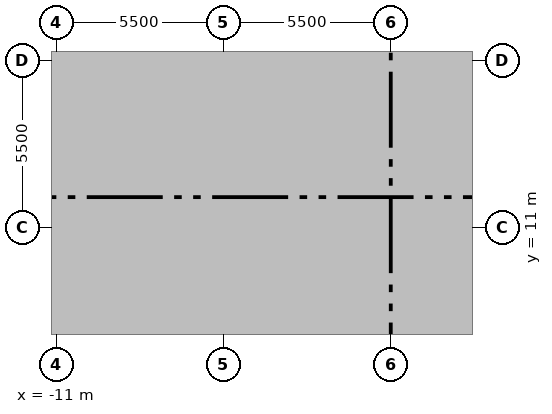
"""IFC4 building model, lengths in metres.
Left out: names, types, materials, properties, quantities, classifications, styles, units other than length and angle.
Written with IfcOpenShell. Run it as: python <this file> out.ifc"""

import sys

from ifc_helpers import new_model, si_unit, direction, frame, frame_2d, origin, origin_2d, place, context, subcontext, project, spatial, rectangle, extrude, source, transform, mapped, element, fill, save


model = new_model("IFC4")
c1 = context("Model", 3, precision=1e-05, world=origin(), true_north=direction((0.0, 1.0)))
c2 = subcontext(c1, "Body", "Model", "MODEL_VIEW")
j1 = project(units=[si_unit("LENGTHUNIT", "METRE"), si_unit("PLANEANGLEUNIT", "RADIAN")], contexts=[c1])
p1 = place(None, origin())
s1 = spatial("IfcSite", under=j1, at=p1, CompositionType="ELEMENT")
p2 = place(p1, origin())
s2 = spatial("IfcBuilding", under=s1, at=p2, CompositionType="ELEMENT")
p3 = place(p2, origin())
s3 = spatial("IfcBuildingStorey", under=s2, at=p3, CompositionType="ELEMENT", Elevation=0.0)
p4 = place(p3, frame((-11.0, 16.175, 0.0), z_axis=(0.0, 0.0, 1.0), x_axis=(1.0, 0.0, 0.0)))
e1 = element("IfcWall", 1, at=p4, inside=s3, PredefinedType="SHEAR", context=c2, shape_type="SweptSolid", body=[
    extrude(rectangle(XDim=22.0, YDim=0.85, at=frame_2d((11.0, 0.0))), origin(), (0.0, 0.0, 1.0), 5.15),
])
p5 = place(p4, frame((3.57, 0.0, 0.0)))
e2 = element("IfcOpeningElement", 2, at=p5, cuts=e1, PredefinedType="OPENING", context=c2, shape_type="SweptSolid", body=[
    extrude(rectangle(XDim=1.3, YDim=2.3, at=frame_2d((0.65, 1.15))), frame((0.0, 0.435, 0.0), z_axis=(0.0, -1.0, 0.0), x_axis=(1.0, 0.0, 0.0)), (0.0, 0.0, 1.0), 0.87),
])
p6 = place(p4, frame((10.0, 0.0, 0.0)))
e3 = element("IfcOpeningElement", 3, at=p6, cuts=e1, PredefinedType="OPENING", context=c2, shape_type="SweptSolid", body=[
    extrude(rectangle(XDim=2.0, YDim=2.4, at=frame_2d((1.0, 1.2))), frame((0.0, 0.435, 0.0), z_axis=(0.0, -1.0, 0.0), x_axis=(1.0, 0.0, 0.0)), (0.0, 0.0, 1.0), 0.87),
])
p7 = place(p3, frame((-10.575, 0.425, 0.0), z_axis=(0.0, 0.0, 1.0), x_axis=(0.0, 1.0, 0.0)))
e4 = element("IfcWall", 4, at=p7, inside=s3, PredefinedType="SHEAR", context=c2, shape_type="SweptSolid", body=[
    extrude(rectangle(XDim=15.75, YDim=0.85, at=frame_2d((7.875, 0.0))), origin(), (0.0, 0.0, 1.0), 5.15),
])
p8 = place(p7, frame((9.125, 0.0, 0.0)))
e5 = element("IfcOpeningElement", 5, at=p8, cuts=e4, PredefinedType="OPENING", context=c2, shape_type="SweptSolid", body=[
    extrude(rectangle(XDim=1.1, YDim=2.2, at=frame_2d((0.55, 1.1))), frame((0.0, 0.435, 0.0), z_axis=(0.0, -1.0, 0.0), x_axis=(1.0, 0.0, 0.0)), (0.0, 0.0, 1.0), 0.87),
])
p9 = place(p3, frame((-5.5, 0.425, 0.0), z_axis=(0.0, 0.0, 1.0), x_axis=(0.0, 1.0, 0.0)))
e6 = element("IfcWall", 6, at=p9, inside=s3, PredefinedType="SHEAR", context=c2, shape_type="SweptSolid", body=[
    extrude(rectangle(XDim=15.75, YDim=0.4, at=frame_2d((7.875, 0.0))), origin(), (0.0, 0.0, 1.0), 5.15),
])
p10 = place(p9, frame((9.075, 0.0, 0.0)))
e7 = element("IfcOpeningElement", 7, at=p10, cuts=e6, PredefinedType="OPENING", context=c2, shape_type="SweptSolid", body=[
    extrude(rectangle(XDim=1.1, YDim=2.2, at=frame_2d((0.55, 1.1))), frame((0.0, 0.21, 0.0), z_axis=(0.0, -1.0, 0.0), x_axis=(1.0, 0.0, 0.0)), (0.0, 0.0, 1.0), 0.42),
])
m1 = source(origin(), c2, "Body", "SweptSolid", [
    extrude(rectangle(XDim=0.45, YDim=0.95, at=origin_2d()), origin(), (0.0, 0.0, 1.0), 5.5),
])
p11 = place(p3, frame((-5.5, 16.05, 0.0), z_axis=(0.0, 0.0, 1.0), x_axis=(1.0, 0.0, 0.0)))
e8 = element("IfcColumn", 8, at=p11, inside=s3, PredefinedType="PILASTER", context=c2, shape_type="MappedRepresentation", body=[
    mapped(m1, transform((0.0, 0.0, 0.0), scale=1.0)),
])
p12 = place(p3, frame((-6.85, 0.85, 0.0), z_axis=(0.0, 0.0, 1.0), x_axis=(0.0, 1.0, 0.0)))
e9 = element("IfcWall", 9, at=p12, inside=s3, PredefinedType="SOLIDWALL", context=c2, shape_type="SweptSolid", body=[
    extrude(rectangle(XDim=7.5, YDim=0.25, at=frame_2d((3.75, 0.0))), origin(), (0.0, 0.0, 1.0), 5.15),
])
p13 = place(p3, frame((-10.15, 8.35, 0.0), z_axis=(0.0, 0.0, 1.0), x_axis=(1.0, 0.0, 0.0)))
e10 = element("IfcWall", 10, at=p13, inside=s3, PredefinedType="SOLIDWALL", context=c2, shape_type="SweptSolid", body=[
    extrude(rectangle(XDim=4.65, YDim=0.22, at=frame_2d((2.325, 0.0))), origin(), (0.0, 0.0, 1.0), 5.15),
])
p14 = place(p13, frame((1.0, 0.0, 0.0)))
e11 = element("IfcOpeningElement", 11, at=p14, cuts=e10, PredefinedType="OPENING", context=c2, shape_type="SweptSolid", body=[
    extrude(rectangle(XDim=1.15, YDim=2.2, at=frame_2d((0.575, 1.1))), frame((0.0, 0.12, 0.0), z_axis=(0.0, -1.0, 0.0), x_axis=(1.0, 0.0, 0.0)), (0.0, 0.0, 1.0), 0.24),
])
p15 = place(p3, frame((-5.5, 11.87, 0.0), z_axis=(0.0, 0.0, 1.0), x_axis=(-1.0, 0.0, 0.0)))
e12 = element("IfcWall", 12, at=p15, inside=s3, PredefinedType="SOLIDWALL", context=c2, shape_type="SweptSolid", body=[
    extrude(rectangle(XDim=4.65, YDim=0.25, at=frame_2d((2.325, 0.0))), origin(), (0.0, 0.0, 1.0), 5.15),
])
p16 = place(p15, frame((2.95, 0.0, 0.0)))
e13 = element("IfcOpeningElement", 13, at=p16, cuts=e12, PredefinedType="OPENING", context=c2, shape_type="SweptSolid", body=[
    extrude(rectangle(XDim=1.2, YDim=2.25, at=frame_2d((0.6, 1.125))), frame((0.0, 0.135, 0.0), z_axis=(0.0, -1.0, 0.0), x_axis=(1.0, 0.0, 0.0)), (0.0, 0.0, 1.0), 0.27),
])
p17 = place(p3, frame((-7.84, 11.87, 0.0), z_axis=(0.0, 0.0, 1.0), x_axis=(0.0, 1.0, 0.0)))
e14 = element("IfcWall", 14, at=p17, inside=s3, PredefinedType="SOLIDWALL", context=c2, shape_type="SweptSolid", body=[
    extrude(rectangle(XDim=3.88, YDim=0.22, at=frame_2d((1.94, 0.0))), origin(), (0.0, 0.0, 1.0), 5.15),
])
p18 = place(p3, frame((-5.5, 8.3, 0.0), z_axis=(0.0, 0.0, 1.0), x_axis=(1.0, 0.0, 0.0)))
e15 = element("IfcWall", 15, at=p18, inside=s3, PredefinedType="SOLIDWALL", context=c2, shape_type="SweptSolid", body=[
    extrude(rectangle(XDim=7.32, YDim=0.22, at=frame_2d((3.66, 0.0))), origin(), (0.0, 0.0, 1.0), 5.15),
])
p19 = place(p18, frame((0.75, 0.0, 0.0)))
e16 = element("IfcOpeningElement", 16, at=p19, cuts=e15, PredefinedType="OPENING", context=c2, shape_type="SweptSolid", body=[
    extrude(rectangle(XDim=1.1, YDim=2.2, at=frame_2d((0.55, 1.1))), frame((0.0, 0.12, 0.0), z_axis=(0.0, -1.0, 0.0), x_axis=(1.0, 0.0, 0.0)), (0.0, 0.0, 1.0), 0.24),
])
p20 = place(p18, frame((3.15, 0.0, 0.0)))
e17 = element("IfcOpeningElement", 17, at=p20, cuts=e15, PredefinedType="OPENING", context=c2, shape_type="SweptSolid", body=[
    extrude(rectangle(XDim=1.1, YDim=2.2, at=frame_2d((0.55, 1.1))), frame((0.0, 0.12, 0.0), z_axis=(0.0, -1.0, 0.0), x_axis=(1.0, 0.0, 0.0)), (0.0, 0.0, 1.0), 0.24),
])
p21 = place(p18, frame((5.55, 0.0, 0.0)))
e18 = element("IfcOpeningElement", 18, at=p21, cuts=e15, PredefinedType="OPENING", context=c2, shape_type="SweptSolid", body=[
    extrude(rectangle(XDim=1.1, YDim=2.2, at=frame_2d((0.55, 1.1))), frame((0.0, 0.12, 0.0), z_axis=(0.0, -1.0, 0.0), x_axis=(1.0, 0.0, 0.0)), (0.0, 0.0, 1.0), 0.24),
])
p22 = place(p3, frame((1.8, 6.0, 0.0), z_axis=(0.0, 0.0, 1.0), x_axis=(0.0, 1.0, 0.0)))
e19 = element("IfcWall", 19, at=p22, inside=s3, PredefinedType="SOLIDWALL", context=c2, shape_type="SweptSolid", body=[
    extrude(rectangle(XDim=2.3, YDim=0.22, at=frame_2d((1.15, 0.0))), origin(), (0.0, 0.0, 1.0), 5.15),
])
for number, where, z_axis, x_axis in (
    (20, (-3.0, 6.0, 0.0), (0.0, 0.0, 1.0), (0.0, 1.0, 0.0)),
    (21, (-0.6, 6.0, 0.0), (0.0, 0.0, 1.0), (0.0, 1.0, 0.0)),
):
    element("IfcWall", number, at=place(p3, frame(where, z_axis=z_axis, x_axis=x_axis)), inside=s3, PredefinedType="SOLIDWALL", context=c2, shape_type="SweptSolid", body=[
        extrude(rectangle(XDim=2.3, YDim=0.18, at=frame_2d((1.15, 0.0))), origin(), (0.0, 0.0, 1.0), 5.15),
    ])
p23 = place(p3, frame((-5.5, 11.32, 0.0), z_axis=(0.0, 0.0, 1.0), x_axis=(1.0, 0.0, 0.0)))
e22 = element("IfcWall", 22, at=p23, inside=s3, PredefinedType="SOLIDWALL", context=c2, shape_type="SweptSolid", body=[
    extrude(rectangle(XDim=7.32, YDim=0.22, at=frame_2d((3.66, 0.0))), origin(), (0.0, 0.0, 1.0), 5.15),
])
p24 = place(p3, frame((-5.5, 13.62, 0.0), z_axis=(0.0, 0.0, 1.0), x_axis=(1.0, 0.0, 0.0)))
e23 = element("IfcWall", 23, at=p24, inside=s3, PredefinedType="SOLIDWALL", context=c2, shape_type="SweptSolid", body=[
    extrude(rectangle(XDim=7.32, YDim=0.22, at=frame_2d((3.66, 0.0))), origin(), (0.0, 0.0, 1.0), 5.15),
])
p25 = place(p24, frame((0.75, 0.0, 0.0)))
e24 = element("IfcOpeningElement", 24, at=p25, cuts=e23, PredefinedType="OPENING", context=c2, shape_type="SweptSolid", body=[
    extrude(rectangle(XDim=1.1, YDim=2.2, at=frame_2d((0.55, 1.1))), frame((0.0, 0.12, 0.0), z_axis=(0.0, -1.0, 0.0), x_axis=(1.0, 0.0, 0.0)), (0.0, 0.0, 1.0), 0.24),
])
p26 = place(p24, frame((3.15, 0.0, 0.0)))
e25 = element("IfcOpeningElement", 25, at=p26, cuts=e23, PredefinedType="OPENING", context=c2, shape_type="SweptSolid", body=[
    extrude(rectangle(XDim=1.1, YDim=2.2, at=frame_2d((0.55, 1.1))), frame((0.0, 0.12, 0.0), z_axis=(0.0, -1.0, 0.0), x_axis=(1.0, 0.0, 0.0)), (0.0, 0.0, 1.0), 0.24),
])
p27 = place(p24, frame((5.55, 0.0, 0.0)))
e26 = element("IfcOpeningElement", 26, at=p27, cuts=e23, PredefinedType="OPENING", context=c2, shape_type="SweptSolid", body=[
    extrude(rectangle(XDim=1.1, YDim=2.2, at=frame_2d((0.55, 1.1))), frame((0.0, 0.12, 0.0), z_axis=(0.0, -1.0, 0.0), x_axis=(1.0, 0.0, 0.0)), (0.0, 0.0, 1.0), 0.24),
])
p28 = place(p3, frame((1.8, 11.32, 0.0), z_axis=(0.0, 0.0, 1.0), x_axis=(0.0, 1.0, 0.0)))
e27 = element("IfcWall", 27, at=p28, inside=s3, PredefinedType="SOLIDWALL", context=c2, shape_type="SweptSolid", body=[
    extrude(rectangle(XDim=2.3, YDim=0.22, at=frame_2d((1.15, 0.0))), origin(), (0.0, 0.0, 1.0), 5.15),
])
for number, where, z_axis, x_axis in (
    (28, (-3.0, 11.32, 0.0), (0.0, 0.0, 1.0), (0.0, 1.0, 0.0)),
    (29, (-0.6, 11.32, 0.0), (0.0, 0.0, 1.0), (0.0, 1.0, 0.0)),
):
    element("IfcWall", number, at=place(p3, frame(where, z_axis=z_axis, x_axis=x_axis)), inside=s3, PredefinedType="SOLIDWALL", context=c2, shape_type="SweptSolid", body=[
        extrude(rectangle(XDim=2.3, YDim=0.18, at=frame_2d((1.15, 0.0))), origin(), (0.0, 0.0, 1.0), 5.15),
    ])
p29 = place(p3, frame((-10.65, 15.8, 0.0), z_axis=(0.0, 0.0, 1.0), x_axis=(0.0, 1.0, 0.0)))
e30 = element("IfcWall", 30, at=p29, inside=s3, PredefinedType="SOLIDWALL", context=c2, shape_type="SweptSolid", body=[
    extrude(rectangle(XDim=1.85, YDim=0.22, at=frame_2d((0.925, 0.0))), origin(), (0.0, 0.0, 1.0), 4.102),
])
m2 = source(origin(), c2, "Body", "SweptSolid", [
    extrude(rectangle(XDim=1.15, YDim=2.2, at=frame_2d((0.575, 1.1))), frame((0.0, 0.025, 0.0), z_axis=(0.0, -1.0, 0.0), x_axis=(1.0, 0.0, 0.0)), (0.0, 0.0, 1.0), 0.05),
])
p30 = place(p14, origin())
e31 = element("IfcDoor", 31, at=p30, inside=s3, OperationType="SINGLE_SWING_LEFT", PredefinedType="DOOR", context=c2, shape_type="MappedRepresentation", body=[
    mapped(m2, transform((0.0, 0.0, 0.0), scale=1.0)),
])
fill(e11, e31)
m3 = source(origin(), c2, "Body", "SweptSolid", [
    extrude(rectangle(XDim=1.1, YDim=2.2, at=frame_2d((0.55, 1.1))), frame((0.0, 0.025, 0.0), z_axis=(0.0, -1.0, 0.0), x_axis=(1.0, 0.0, 0.0)), (0.0, 0.0, 1.0), 0.05),
])
p31 = place(p10, origin())
e32 = element("IfcDoor", 32, at=p31, inside=s3, OperationType="SINGLE_SWING_RIGHT", PredefinedType="DOOR", context=c2, shape_type="MappedRepresentation", body=[
    mapped(m3, transform((0.0, 0.0, 0.0), scale=1.0)),
])
fill(e7, e32)
m4 = source(origin(), c2, "Body", "SweptSolid", [
    extrude(rectangle(XDim=1.2, YDim=2.25, at=frame_2d((0.6, 1.125))), frame((0.0, 0.025, 0.0), z_axis=(0.0, -1.0, 0.0), x_axis=(1.0, 0.0, 0.0)), (0.0, 0.0, 1.0), 0.05),
])
p32 = place(p16, origin())
e33 = element("IfcDoor", 33, at=p32, inside=s3, OperationType="SLIDING_TO_LEFT", PredefinedType="DOOR", context=c2, shape_type="MappedRepresentation", body=[
    mapped(m4, transform((0.0, 0.0, 0.0), scale=1.0)),
])
fill(e13, e33)
m5 = source(origin(), c2, "Body", "SweptSolid", [
    extrude(rectangle(XDim=1.3, YDim=2.3, at=frame_2d((0.65, 1.15))), frame((0.0, 0.025, 0.0), z_axis=(0.0, -1.0, 0.0), x_axis=(1.0, 0.0, 0.0)), (0.0, 0.0, 1.0), 0.05),
])
p33 = place(p5, origin())
e34 = element("IfcDoor", 34, at=p33, inside=s3, OperationType="SLIDING_TO_RIGHT", PredefinedType="DOOR", context=c2, shape_type="MappedRepresentation", body=[
    mapped(m5, transform((0.0, 0.0, 0.0), scale=1.0)),
])
fill(e2, e34)
p34 = place(p8, origin())
e35 = element("IfcDoor", 35, at=p34, inside=s3, OperationType="SINGLE_SWING_LEFT", PredefinedType="DOOR", context=c2, shape_type="MappedRepresentation", body=[
    mapped(m3, transform((0.0, 0.0, 0.0), scale=1.0)),
])
fill(e5, e35)
m6 = source(origin(), c2, "Body", "SweptSolid", [
    extrude(rectangle(XDim=2.0, YDim=2.4, at=frame_2d((1.0, 1.2))), frame((0.0, 0.025, 0.0), z_axis=(0.0, -1.0, 0.0), x_axis=(1.0, 0.0, 0.0)), (0.0, 0.0, 1.0), 0.05),
])
p35 = place(p6, origin())
e36 = element("IfcDoor", 36, at=p35, inside=s3, OperationType="DOUBLE_DOOR_SINGLE_SWING", PredefinedType="DOOR", context=c2, shape_type="MappedRepresentation", body=[
    mapped(m6, transform((0.0, 0.0, 0.0), scale=1.0)),
])
fill(e3, e36)
m7 = source(origin(), c2, "Body", "SweptSolid", [
    extrude(rectangle(XDim=1.1, YDim=2.2, at=frame_2d((0.55, 1.1))), frame((0.0, 0.025, 0.0), z_axis=(0.0, -1.0, 0.0), x_axis=(1.0, 0.0, 0.0)), (0.0, 0.0, 1.0), 0.05),
])
p36 = place(p19, origin())
e37 = element("IfcDoor", 37, at=p36, inside=s3, OperationType="SLIDING_TO_LEFT", PredefinedType="DOOR", context=c2, shape_type="MappedRepresentation", body=[
    mapped(m7, transform((0.0, 0.0, 0.0), scale=1.0)),
])
fill(e16, e37)
p37 = place(p20, origin())
e38 = element("IfcDoor", 38, at=p37, inside=s3, OperationType="SLIDING_TO_LEFT", PredefinedType="DOOR", context=c2, shape_type="MappedRepresentation", body=[
    mapped(m7, transform((0.0, 0.0, 0.0), scale=1.0)),
])
fill(e17, e38)
p38 = place(p21, origin())
e39 = element("IfcDoor", 39, at=p38, inside=s3, OperationType="SLIDING_TO_LEFT", PredefinedType="DOOR", context=c2, shape_type="MappedRepresentation", body=[
    mapped(m7, transform((0.0, 0.0, 0.0), scale=1.0)),
])
fill(e18, e39)
p39 = place(p25, origin())
e40 = element("IfcDoor", 40, at=p39, inside=s3, OperationType="SLIDING_TO_RIGHT", PredefinedType="DOOR", context=c2, shape_type="MappedRepresentation", body=[
    mapped(m7, transform((0.0, 0.0, 0.0), scale=1.0)),
])
fill(e24, e40)
p40 = place(p26, origin())
e41 = element("IfcDoor", 41, at=p40, inside=s3, OperationType="SLIDING_TO_RIGHT", PredefinedType="DOOR", context=c2, shape_type="MappedRepresentation", body=[
    mapped(m7, transform((0.0, 0.0, 0.0), scale=1.0)),
])
fill(e25, e41)
p41 = place(p27, origin())
e42 = element("IfcDoor", 42, at=p41, inside=s3, OperationType="SLIDING_TO_RIGHT", PredefinedType="DOOR", context=c2, shape_type="MappedRepresentation", body=[
    mapped(m7, transform((0.0, 0.0, 0.0), scale=1.0)),
])
fill(e26, e42)
save(model, sys.argv[1])
